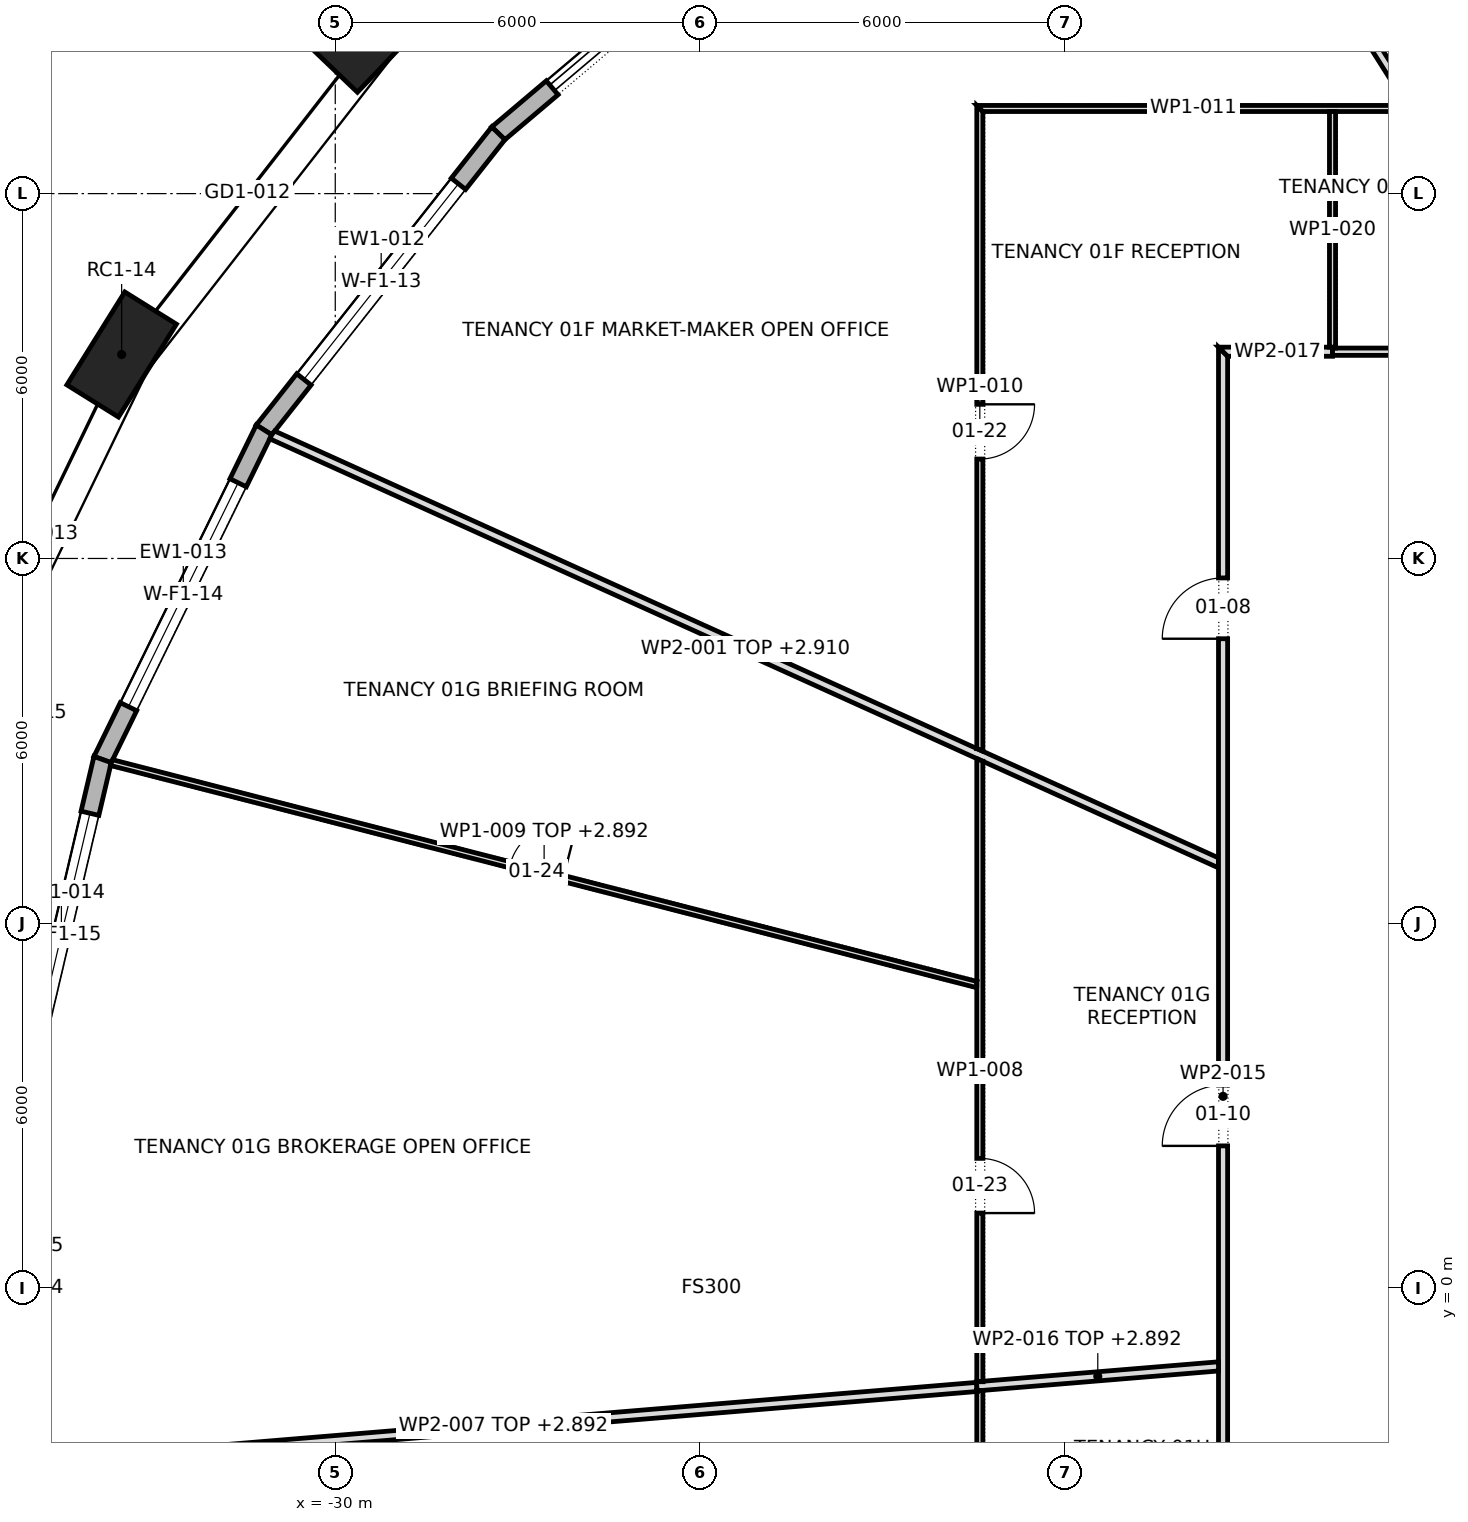
"""IFC4 building model, lengths in metres.
Left out: names, types, materials, properties, quantities, classifications, styles, units other than length and angle.
Written with IfcOpenShell. Run it as: python <this file> out.ifc"""

import sys

from ifc_helpers import new_model, si_unit, direction, frame, frame_2d, origin, origin_2d, place, context, subcontext, project, spatial, polyline, rectangle, outline, extrude, element, fill, save


model = new_model("IFC4")
c1 = context("Model", 3, precision=1e-05, world=origin(), true_north=direction((0.0, 1.0)))
c2 = subcontext(c1, "Body", "Model", "MODEL_VIEW")
j1 = project(units=[si_unit("LENGTHUNIT", "METRE"), si_unit("PLANEANGLEUNIT", "RADIAN")], contexts=[c1])
p1 = place(None, origin())
s1 = spatial("IfcSite", under=j1, at=p1, CompositionType="ELEMENT")
p2 = place(p1, origin())
s2 = spatial("IfcBuilding", under=s1, at=p2, CompositionType="ELEMENT")
p3 = place(p2, frame((0.0, 0.0, 27.7)))
s3 = spatial("IfcBuildingStorey", under=s2, at=p3, CompositionType="ELEMENT", Elevation=27.7)
for number, where, z_axis, x_axis in (
    (1, (-29.375, 20.663, 0.0), (0.0, 0.0, 1.0), (-0.692, -0.722, 0.0)),
    (2, (-33.513, 15.354, 0.0), (0.0, 0.0, 1.0), (-0.529, -0.849, 0.0)),
):
    element("IfcColumn", number, at=place(p3, frame(where, z_axis=z_axis, x_axis=x_axis)), inside=s3, PredefinedType="COLUMN", context=c2, shape_type="SweptSolid", body=[
        extrude(rectangle(XDim=1.8, YDim=1.0, at=origin_2d()), origin(), (0.0, 0.0, 1.0), 4.2),
    ])
p4 = place(p3, frame((-22.417, 23.137, 0.0), z_axis=(0.0, 0.0, 1.0), x_axis=(-0.763540615407, -0.645759807223, 0.0)))
e3 = element("IfcWall", 3, at=p4, inside=s3, PredefinedType="STANDARD", context=c2, shape_type="SweptSolid", body=[
    extrude(outline(polyline([(-0.014, -0.15), (6.435, -0.15), (6.405, 0.15), (0.014, 0.15), (-0.014, -0.15)])), origin(), (0.0, 0.0, 1.0), 3.9),
])
p5 = place(p4, frame((1.16, 0.0, 0.0)))
e4 = element("IfcOpeningElement", 4, at=p5, cuts=e3, PredefinedType="OPENING", context=c2, shape_type="SweptSolid", body=[
    extrude(rectangle(XDim=4.1, YDim=3.45, at=frame_2d((2.05, 1.725))), frame((0.0, 0.162, 0.0), z_axis=(0.0, -1.0, 0.0), x_axis=(1.0, 0.0, 0.0)), (0.0, 0.0, 1.0), 0.324),
])
p6 = place(p3, frame((-27.318, 18.992, 0.0), z_axis=(0.0, 0.0, 1.0), x_axis=(-0.619902786528, -0.784678619089, 0.0)))
e5 = element("IfcWall", 5, at=p6, inside=s3, PredefinedType="STANDARD", context=c2, shape_type="SweptSolid", body=[
    extrude(outline(polyline([(-0.015, -0.15), (6.232, -0.15), (6.199, 0.15), (0.015, 0.15), (-0.015, -0.15)])), origin(), (0.0, 0.0, 1.0), 3.9),
])
p7 = place(p6, frame((1.058, 0.0, 0.6)))
e6 = element("IfcOpeningElement", 6, at=p7, cuts=e5, PredefinedType="OPENING", context=c2, shape_type="SweptSolid", body=[
    extrude(rectangle(XDim=4.1, YDim=2.85, at=frame_2d((2.05, 1.425))), frame((0.0, 0.162, 0.0), z_axis=(0.0, -1.0, 0.0), x_axis=(1.0, 0.0, 0.0)), (0.0, 0.0, 1.0), 0.324),
])
p8 = place(p3, frame((-31.171, 14.115, 0.0), z_axis=(0.0, 0.0, 1.0), x_axis=(-0.439821516427, -0.898085204025, 0.0)))
e7 = element("IfcWall", 7, at=p8, inside=s3, PredefinedType="STANDARD", context=c2, shape_type="SweptSolid", body=[
    extrude(outline(polyline([(-0.016, -0.15), (6.053, -0.15), (6.02, 0.15), (0.016, 0.15), (-0.016, -0.15)])), origin(), (0.0, 0.0, 1.0), 3.9),
])
p9 = place(p8, frame((0.969, 0.0, 0.6)))
e8 = element("IfcOpeningElement", 8, at=p9, cuts=e7, PredefinedType="OPENING", context=c2, shape_type="SweptSolid", body=[
    extrude(rectangle(XDim=4.1, YDim=2.85, at=frame_2d((2.05, 1.425))), frame((0.0, 0.162, 0.0), z_axis=(0.0, -1.0, 0.0), x_axis=(1.0, 0.0, 0.0)), (0.0, 0.0, 1.0), 0.324),
])
p10 = place(p3, frame((-33.826, 8.693, 0.0), z_axis=(0.0, 0.0, 1.0), x_axis=(-0.228924296831, -0.973444228665, 0.0)))
e9 = element("IfcWall", 9, at=p10, inside=s3, PredefinedType="STANDARD", context=c2, shape_type="SweptSolid", body=[
    extrude(outline(polyline([(-0.017, -0.15), (5.932, -0.15), (5.897, 0.15), (0.017, 0.15), (-0.017, -0.15)])), origin(), (0.0, 0.0, 1.0), 3.9),
])
p11 = place(p10, frame((0.907, 0.0, 0.6)))
e10 = element("IfcOpeningElement", 10, at=p11, cuts=e9, PredefinedType="OPENING", context=c2, shape_type="SweptSolid", body=[
    extrude(rectangle(XDim=4.1, YDim=2.85, at=frame_2d((2.05, 1.425))), frame((0.0, 0.162, 0.0), z_axis=(0.0, -1.0, 0.0), x_axis=(1.0, 0.0, 0.0)), (0.0, 0.0, 1.0), 0.324),
])
p12 = place(p3, frame((-31.045, 14.036, 0.0), z_axis=(0.0, 0.0, 1.0), x_axis=(0.911148076593, -0.412079097407, 0.0)))
e11 = element("IfcWall", 11, at=p12, inside=s3, PredefinedType="PARTITIONING", context=c2, shape_type="SweptSolid", body=[
    extrude(outline(polyline([(0.0, -0.075), (1.838, -0.075), (3.677, -0.075), (5.515, -0.075), (7.353, -0.075), (9.191, -0.075), (11.03, -0.075), (12.868, -0.075), (12.869, -0.074), (12.87, -0.075), (14.287, -0.075), (15.705, -0.075), (17.123, -0.075), (17.106, -0.038), (17.106, -0.038), (17.055, 0.075), (15.602, 0.075), (14.149, 0.075), (12.696, 0.075), (12.693, 0.074), (12.692, 0.075), (10.882, 0.075), (9.072, 0.075), (7.262, 0.075), (5.452, 0.075), (3.642, 0.075), (1.831, 0.075), (0.021, 0.075), (0.002, -0.001), (0.0, -0.075)])), origin(), (0.0, 0.0, 1.0), 2.91),
])
p13 = place(p3, frame((-19.4, -19.45, 0.0), z_axis=(0.0, 0.0, 1.0), x_axis=(0.0, 1.0, 0.0)))
e12 = element("IfcWall", 12, at=p13, inside=s3, PredefinedType="PARTITIONING", context=c2, shape_type="SweptSolid", body=[
    extrude(outline(polyline([(0.1, -0.05), (1.802, -0.05), (3.503, -0.05), (5.205, -0.05), (6.907, -0.05), (8.608, -0.05), (10.31, -0.05), (10.31, -0.05), (10.41, -0.05), (10.41, -0.05), (12.25, -0.05), (14.089, -0.05), (15.929, -0.05), (17.769, -0.05), (17.769, -0.047), (17.761, 0.044), (17.769, 0.044), (17.769, 0.045), (17.751, 0.044), (17.75, 0.05), (16.082, 0.05), (14.413, 0.05), (14.406, 0.048), (14.406, 0.05), (12.702, 0.05), (10.999, 0.05), (9.296, 0.05), (7.593, 0.05), (5.89, 0.05), (5.886, 0.048), (5.885, 0.05), (3.923, 0.05), (1.961, 0.05), (0.0, 0.05), (0.1, -0.05), (0.1, -0.05)])), origin(), (0.0, 0.0, 1.0), 3.9),
])
p14 = place(p13, frame((11.965, 0.0, 0.0)))
e13 = element("IfcOpeningElement", 13, at=p14, cuts=e12, PredefinedType="OPENING", context=c2, shape_type="SweptSolid", body=[
    extrude(rectangle(XDim=0.9, YDim=2.1, at=frame_2d((0.45, 1.05))), frame((0.0, 0.062, 0.0), z_axis=(0.0, -1.0, 0.0), x_axis=(1.0, 0.0, 0.0)), (0.0, 0.0, 1.0), 0.124),
])
p15 = place(p3, frame((-19.449, -1.624, 0.0), z_axis=(0.0, 0.0, 1.0), x_axis=(-0.996584649275, -0.082577459574, 0.0)))
e14 = element("IfcWall", 14, at=p15, inside=s3, PredefinedType="PARTITIONING", context=c2, shape_type="SweptSolid", body=[
    extrude(outline(polyline([(15.628, -0.075), (15.628, 0.048), (15.624, 0.075), (13.672, 0.075), (11.72, 0.075), (9.768, 0.075), (7.816, 0.075), (5.864, 0.075), (3.911, 0.075), (1.959, 0.075), (0.007, 0.075), (0.006, 0.057), (0.0, 0.058), (0.0, -0.075), (1.954, -0.075), (3.907, -0.075), (5.861, -0.075), (7.814, -0.075), (9.768, -0.075), (11.721, -0.075), (13.675, -0.075), (15.628, -0.075)])), origin(), (0.0, 0.0, 1.0), 2.892),
])
p16 = place(p3, frame((-19.4, -1.539, 0.0), z_axis=(0.0, 0.0, 1.0), x_axis=(0.0, 1.0, 0.0)))
e15 = element("IfcWall", 15, at=p16, inside=s3, PredefinedType="PARTITIONING", context=c2, shape_type="SweptSolid", body=[
    extrude(outline(polyline([(0.008, -0.05), (1.707, -0.05), (3.406, -0.05), (5.105, -0.05), (6.804, -0.05), (8.503, -0.05), (10.203, -0.05), (10.248, 0.049), (10.248, 0.05), (8.415, 0.05), (6.583, 0.05), (6.583, 0.048), (6.575, 0.05), (4.932, 0.05), (3.288, 0.05), (1.644, 0.05), (0.0, 0.05), (0.0, 0.046), (0.008, -0.05)])), origin(), (0.0, 0.0, 1.0), 3.9),
])
p17 = place(p16, frame((2.773, 0.0, 0.0)))
e16 = element("IfcOpeningElement", 16, at=p17, cuts=e15, PredefinedType="OPENING", context=c2, shape_type="SweptSolid", body=[
    extrude(rectangle(XDim=0.9, YDim=2.1, at=frame_2d((0.45, 1.05))), frame((0.0, 0.062, 0.0), z_axis=(0.0, -1.0, 0.0), x_axis=(1.0, 0.0, 0.0)), (0.0, 0.0, 1.0), 0.124),
])
p18 = place(p3, frame((-19.438, 4.99, 0.0), z_axis=(0.0, 0.0, 1.0), x_axis=(-0.968638974519, 0.248472407007, 0.0)))
e17 = element("IfcWall", 17, at=p18, inside=s3, PredefinedType="PARTITIONING", context=c2, shape_type="SweptSolid", body=[
    extrude(outline(polyline([(0.025, -0.05), (1.859, -0.05), (3.693, -0.05), (5.527, -0.05), (7.361, -0.05), (9.195, -0.05), (11.029, -0.05), (12.863, -0.05), (14.697, -0.05), (14.706, -0.004), (14.706, 0.05), (12.868, 0.05), (11.03, 0.05), (9.191, 0.05), (7.353, 0.05), (5.515, 0.05), (3.677, 0.05), (1.838, 0.05), (0.0, 0.05), (0.0, 0.049), (0.025, -0.05)])), origin(), (0.0, 0.0, 1.0), 2.892),
])
p19 = place(p18, frame((7.037, 0.0, 0.0)))
e18 = element("IfcOpeningElement", 18, at=p19, cuts=e17, PredefinedType="OPENING", context=c2, shape_type="SweptSolid", body=[
    extrude(rectangle(XDim=0.9, YDim=2.1, at=frame_2d((0.45, 1.05))), frame((0.0, 0.062, 0.0), z_axis=(0.0, -1.0, 0.0), x_axis=(1.0, 0.0, 0.0)), (0.0, 0.0, 1.0), 0.124),
])
p20 = place(p3, frame((-19.4, 8.829, 0.0), z_axis=(0.0, 0.0, 1.0), x_axis=(0.0, 1.0, 0.0)))
e19 = element("IfcWall", 19, at=p20, inside=s3, PredefinedType="PARTITIONING", context=c2, shape_type="SweptSolid", body=[
    extrude(outline(polyline([(0.0, -0.05), (1.753, -0.05), (3.507, -0.05), (5.26, -0.05), (7.014, -0.05), (8.767, -0.05), (10.521, -0.05), (10.521, -0.05), (10.621, 0.05), (8.858, 0.05), (7.095, 0.05), (5.333, 0.05), (3.57, 0.05), (1.808, 0.05), (0.045, 0.05), (0.0, -0.049), (0.0, -0.05)])), origin(), (0.0, 0.0, 1.0), 3.9),
])
p21 = place(p20, frame((4.806, 0.0, 0.0)))
e20 = element("IfcOpeningElement", 20, at=p21, cuts=e19, PredefinedType="OPENING", context=c2, shape_type="SweptSolid", body=[
    extrude(rectangle(XDim=0.9, YDim=2.1, at=frame_2d((0.45, 1.05))), frame((0.0, 0.062, 0.0), z_axis=(0.0, -1.0, 0.0), x_axis=(1.0, 0.0, 0.0)), (0.0, 0.0, 1.0), 0.124),
])
p22 = place(p3, frame((-19.45, 19.4, 0.0), z_axis=(0.0, 0.0, 1.0), x_axis=(1.0, 0.0, 0.0)))
e21 = element("IfcWall", 21, at=p22, inside=s3, PredefinedType="PARTITIONING", context=c2, shape_type="SweptSolid", body=[
    extrude(outline(polyline([(7.075, 0.05), (5.306, 0.05), (3.538, 0.05), (1.769, 0.05), (0.0, 0.05), (0.1, -0.05), (1.844, -0.05), (3.587, -0.05), (5.331, -0.05), (7.075, -0.05), (7.075, 0.05)])), origin(), (0.0, 0.0, 1.0), 3.9),
])
p23 = place(p3, frame((-16.592, 26.26, 0.0), z_axis=(0.0, 0.0, 1.0), x_axis=(0.534158681269, -0.845384234077, 0.0)))
e22 = element("IfcWall", 22, at=p23, inside=s3, PredefinedType="PARTITIONING", context=c2, shape_type="SweptSolid", body=[
    extrude(outline(polyline([(0.0, -0.075), (1.602, -0.075), (3.204, -0.075), (4.805, -0.075), (6.407, -0.075), (8.009, -0.075), (8.01, -0.073), (8.014, -0.075), (9.585, -0.075), (11.157, -0.075), (12.729, -0.075), (12.782, 0.01), (12.782, 0.01), (12.796, 0.032), (12.783, 0.04), (12.805, 0.075), (12.805, 0.075), (11.278, 0.075), (9.75, 0.075), (8.222, 0.075), (8.22, 0.073), (8.217, 0.075), (6.577, 0.075), (4.938, 0.075), (3.299, 0.075), (1.66, 0.075), (0.021, 0.075), (0.003, -0.003), (0.0, -0.07), (0.0, -0.075)])), origin(), (0.0, 0.0, 1.0), 2.91),
])
p24 = place(p3, frame((-15.4, -9.09, 0.0), z_axis=(0.0, 0.0, 1.0), x_axis=(0.0, 1.0, 0.0)))
e23 = element("IfcWall", 23, at=p24, inside=s3, PredefinedType="PARTITIONING", context=c2, shape_type="SweptSolid", body=[
    extrude(outline(polyline([(0.0, -0.075), (1.878, -0.075), (3.756, -0.075), (5.634, -0.075), (7.512, -0.075), (9.39, -0.075), (11.269, -0.075), (13.146, -0.075), (15.025, -0.075), (16.903, -0.075), (18.781, -0.075), (20.659, -0.075), (22.537, -0.075), (24.415, -0.075), (24.565, 0.075), (22.675, 0.075), (20.786, 0.075), (18.896, 0.075), (17.007, 0.075), (15.117, 0.075), (13.227, 0.075), (11.338, 0.075), (9.448, 0.075), (7.558, 0.075), (5.669, 0.075), (3.779, 0.075), (1.89, 0.075), (0.0, 0.075), (0.0, -0.075)])), origin(), (0.0, 0.0, 1.0), 3.9),
])
p25 = place(p24, frame((19.77, 0.0, 0.0)))
e24 = element("IfcOpeningElement", 24, at=p25, cuts=e23, PredefinedType="OPENING", context=c2, shape_type="SweptSolid", body=[
    extrude(rectangle(XDim=1.0, YDim=2.1, at=frame_2d((0.5, 1.05))), frame((0.0, 0.087, 0.0), z_axis=(0.0, -1.0, 0.0), x_axis=(1.0, 0.0, 0.0)), (0.0, 0.0, 1.0), 0.174),
])
p26 = place(p24, frame((11.43, 0.0, 0.0)))
e25 = element("IfcOpeningElement", 25, at=p26, cuts=e23, PredefinedType="OPENING", context=c2, shape_type="SweptSolid", body=[
    extrude(rectangle(XDim=1.0, YDim=2.1, at=frame_2d((0.5, 1.05))), frame((0.0, 0.087, 0.0), z_axis=(0.0, -1.0, 0.0), x_axis=(1.0, 0.0, 0.0)), (0.0, 0.0, 1.0), 0.174),
])
p27 = place(p24, frame((3.405, 0.0, 0.0)))
e26 = element("IfcOpeningElement", 26, at=p27, cuts=e23, PredefinedType="OPENING", context=c2, shape_type="SweptSolid", body=[
    extrude(rectangle(XDim=1.0, YDim=2.1, at=frame_2d((0.5, 1.05))), frame((0.0, 0.087, 0.0), z_axis=(0.0, -1.0, 0.0), x_axis=(1.0, 0.0, 0.0)), (0.0, 0.0, 1.0), 0.174),
])
p28 = place(p3, frame((-15.469, -1.286, 0.0), z_axis=(0.0, 0.0, 1.0), x_axis=(-0.996614549641, -0.082215810186, 0.0)))
e27 = element("IfcWall", 27, at=p28, inside=s3, PredefinedType="PARTITIONING", context=c2, shape_type="SweptSolid", body=[
    extrude(outline(polyline([(0.0, -0.075), (1.944, -0.075), (3.888, -0.075), (3.888, -0.067), (3.984, -0.075), (3.994, -0.075), (3.994, 0.068), (3.906, 0.075), (1.959, 0.075), (0.012, 0.075), (0.0, -0.07), (0.0, -0.075)])), origin(), (0.0, 0.0, 1.0), 2.892),
])
p29 = place(p3, frame((-15.475, 15.4, 0.0), z_axis=(0.0, 0.0, 1.0), x_axis=(1.0, 0.0, 0.0)))
e28 = element("IfcWall", 28, at=p29, inside=s3, PredefinedType="PARTITIONING", context=c2, shape_type="SweptSolid", body=[
    extrude(outline(polyline([(1.875, 0.075), (0.0, 0.075), (0.15, -0.075), (1.875, -0.075), (1.875, 0.075)])), origin(), (0.0, 0.0, 1.0), 3.9),
])
p30 = place(p3, frame((-13.6, 15.4, 0.0), z_axis=(0.0, 0.0, 1.0), x_axis=(1.0, 0.0, 0.0)))
e29 = element("IfcWall", 29, at=p30, inside=s3, PredefinedType="PARTITIONING", context=c2, shape_type="SweptSolid", body=[
    extrude(rectangle(XDim=3.87, YDim=0.12, at=frame_2d((1.935, 0.0))), origin(), (0.0, 0.0, 1.0), 3.9),
])
p31 = place(p30, frame((1.435, 0.0, 0.0)))
e30 = element("IfcOpeningElement", 30, at=p31, cuts=e29, PredefinedType="OPENING", context=c2, shape_type="SweptSolid", body=[
    extrude(rectangle(XDim=1.0, YDim=2.1, at=frame_2d((0.5, 1.05))), frame((0.0, 0.072, 0.0), z_axis=(0.0, -1.0, 0.0), x_axis=(1.0, 0.0, 0.0)), (0.0, 0.0, 1.0), 0.144),
])
p32 = place(p3, frame((-13.6, 19.35, 0.0), z_axis=(0.0, 0.0, 1.0), x_axis=(0.0, -1.0, 0.0)))
e31 = element("IfcWall", 31, at=p32, inside=s3, PredefinedType="PARTITIONING", context=c2, shape_type="SweptSolid", body=[
    extrude(outline(polyline([(0.0, -0.05), (1.938, -0.05), (3.875, -0.05), (3.875, 0.0), (3.89, 0.0), (3.89, 0.05), (1.945, 0.05), (0.0, 0.05), (0.0, -0.05)])), origin(), (0.0, 0.0, 1.0), 3.9),
])
p33 = place(p5, origin())
e32 = element("IfcDoor", 32, at=p33, inside=s3, OperationType="DOUBLE_DOOR_SLIDING", PredefinedType="DOOR", context=c2, shape_type="SweptSolid", body=[
    extrude(rectangle(XDim=4.1, YDim=3.45, at=frame_2d((2.05, 1.725))), frame((0.0, 0.025, 0.0), z_axis=(0.0, -1.0, 0.0), x_axis=(1.0, 0.0, 0.0)), (0.0, 0.0, 1.0), 0.05),
])
fill(e4, e32)
p34 = place(p7, origin())
e33 = element("IfcWindow", 33, at=p34, inside=s3, PartitioningType="TRIPLE_PANEL_VERTICAL", PredefinedType="WINDOW", context=c2, shape_type="SweptSolid", body=[
    extrude(rectangle(XDim=4.1, YDim=2.85, at=frame_2d((2.05, 1.425))), frame((0.0, 0.03, 0.0), z_axis=(0.0, -1.0, 0.0), x_axis=(1.0, 0.0, 0.0)), (0.0, 0.0, 1.0), 0.06),
])
fill(e6, e33)
p35 = place(p9, origin())
e34 = element("IfcWindow", 34, at=p35, inside=s3, PartitioningType="TRIPLE_PANEL_VERTICAL", PredefinedType="WINDOW", context=c2, shape_type="SweptSolid", body=[
    extrude(rectangle(XDim=4.1, YDim=2.85, at=frame_2d((2.05, 1.425))), frame((0.0, 0.03, 0.0), z_axis=(0.0, -1.0, 0.0), x_axis=(1.0, 0.0, 0.0)), (0.0, 0.0, 1.0), 0.06),
])
fill(e8, e34)
p36 = place(p11, origin())
e35 = element("IfcWindow", 35, at=p36, inside=s3, PartitioningType="TRIPLE_PANEL_VERTICAL", PredefinedType="WINDOW", context=c2, shape_type="SweptSolid", body=[
    extrude(rectangle(XDim=4.1, YDim=2.85, at=frame_2d((2.05, 1.425))), frame((0.0, 0.03, 0.0), z_axis=(0.0, -1.0, 0.0), x_axis=(1.0, 0.0, 0.0)), (0.0, 0.0, 1.0), 0.06),
])
fill(e10, e35)
p37 = place(p25, origin())
e36 = element("IfcDoor", 36, at=p37, inside=s3, OperationType="SINGLE_SWING_RIGHT", PredefinedType="DOOR", context=c2, shape_type="SweptSolid", body=[
    extrude(rectangle(XDim=1.0, YDim=2.1, at=frame_2d((0.5, 1.05))), frame((0.0, 0.025, 0.0), z_axis=(0.0, -1.0, 0.0), x_axis=(1.0, 0.0, 0.0)), (0.0, 0.0, 1.0), 0.05),
])
fill(e24, e36)
p38 = place(p26, origin())
e37 = element("IfcDoor", 37, at=p38, inside=s3, OperationType="SINGLE_SWING_RIGHT", PredefinedType="DOOR", context=c2, shape_type="SweptSolid", body=[
    extrude(rectangle(XDim=1.0, YDim=2.1, at=frame_2d((0.5, 1.05))), frame((0.0, 0.025, 0.0), z_axis=(0.0, -1.0, 0.0), x_axis=(1.0, 0.0, 0.0)), (0.0, 0.0, 1.0), 0.05),
])
fill(e25, e37)
p39 = place(p21, frame((0.9, 0.0, 0.0), z_axis=(0.0, 0.0, 1.0), x_axis=(-1.0, 0.0, 0.0)))
e38 = element("IfcDoor", 38, at=p39, inside=s3, OperationType="SINGLE_SWING_RIGHT", PredefinedType="DOOR", context=c2, shape_type="SweptSolid", body=[
    extrude(rectangle(XDim=0.9, YDim=2.1, at=frame_2d((0.45, 1.05))), frame((0.0, 0.025, 0.0), z_axis=(0.0, -1.0, 0.0), x_axis=(1.0, 0.0, 0.0)), (0.0, 0.0, 1.0), 0.05),
])
fill(e20, e38)
p40 = place(p17, frame((0.9, 0.0, 0.0), z_axis=(0.0, 0.0, 1.0), x_axis=(-1.0, 0.0, 0.0)))
e39 = element("IfcDoor", 39, at=p40, inside=s3, OperationType="SINGLE_SWING_LEFT", PredefinedType="DOOR", context=c2, shape_type="SweptSolid", body=[
    extrude(rectangle(XDim=0.9, YDim=2.1, at=frame_2d((0.45, 1.05))), frame((0.0, 0.025, 0.0), z_axis=(0.0, -1.0, 0.0), x_axis=(1.0, 0.0, 0.0)), (0.0, 0.0, 1.0), 0.05),
])
fill(e16, e39)
p41 = place(p19, frame((0.9, 0.0, 0.0), z_axis=(0.0, 0.0, 1.0), x_axis=(-1.0, 0.0, 0.0)))
e40 = element("IfcDoor", 40, at=p41, inside=s3, OperationType="SINGLE_SWING_LEFT", PredefinedType="DOOR", context=c2, shape_type="SweptSolid", body=[
    extrude(rectangle(XDim=0.9, YDim=2.1, at=frame_2d((0.45, 1.05))), frame((0.0, 0.025, 0.0), z_axis=(0.0, -1.0, 0.0), x_axis=(1.0, 0.0, 0.0)), (0.0, 0.0, 1.0), 0.05),
])
fill(e18, e40)
save(model, sys.argv[1])
